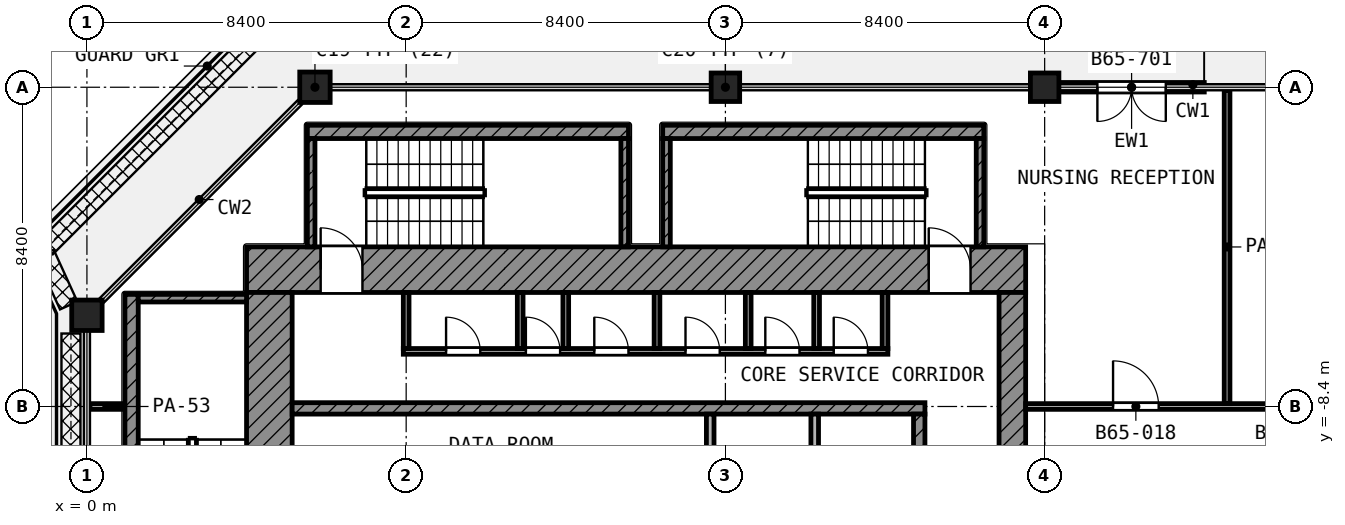
"""IFC4 building model, lengths in metres.
Left out: names, types, materials, properties, quantities, classifications, styles, units other than length and angle.
Written with IfcOpenShell. Run it as: python <this file> out.ifc"""

import sys

from ifc_helpers import new_model, si_unit, direction, frame, frame_2d, origin, origin_2d, place, context, subcontext, project, spatial, rectangle, extrude, element, fill, save


model = new_model("IFC4")
c1 = context("Model", 3, precision=1e-05, world=origin(), true_north=direction((0.0, 1.0)))
c2 = subcontext(c1, "Body", "Model", "MODEL_VIEW")
j1 = project(units=[si_unit("LENGTHUNIT", "METRE"), si_unit("PLANEANGLEUNIT", "RADIAN")], contexts=[c1])
p1 = place(None, origin())
s1 = spatial("IfcSite", under=j1, at=p1, CompositionType="ELEMENT")
p2 = place(p1, origin())
s2 = spatial("IfcBuilding", under=s1, at=p2, CompositionType="ELEMENT")
p3 = place(p2, frame((0.0, 0.0, 281.8)))
s3 = spatial("IfcBuildingStorey", under=s2, at=p3, CompositionType="ELEMENT", Elevation=281.8)
p4 = place(p3, frame((6.0, 0.0, 0.0), z_axis=(0.0, 0.0, 1.0), x_axis=(1.0, 0.0, 0.0)))
e1 = element("IfcColumn", 1, at=p4, inside=s3, PredefinedType="COLUMN", context=c2, shape_type="SweptSolid", body=[
    extrude(rectangle(XDim=0.8, YDim=0.8, at=origin_2d()), origin(), (0.0, 0.0, 1.0), 4.2),
])
for number, where, z_axis, x_axis in (
    (2, (16.8, 0.0, 0.0), (0.0, 0.0, 1.0), (1.0, 0.0, 0.0)),
    (3, (25.2, 0.0, 0.0), (0.0, 0.0, 1.0), (1.0, 0.0, 0.0)),
):
    element("IfcColumn", number, at=place(p3, frame(where, z_axis=z_axis, x_axis=x_axis)), inside=s3, PredefinedType="COLUMN", context=c2, shape_type="SweptSolid", body=[
        extrude(rectangle(XDim=0.75, YDim=0.75, at=origin_2d()), origin(), (0.0, 0.0, 1.0), 4.2),
    ])
p5 = place(p3, frame((0.0, -6.0, 0.0), z_axis=(0.0, 0.0, 1.0), x_axis=(1.0, 0.0, 0.0)))
e4 = element("IfcColumn", 4, at=p5, inside=s3, PredefinedType="COLUMN", context=c2, shape_type="SweptSolid", body=[
    extrude(rectangle(XDim=0.8, YDim=0.8, at=origin_2d()), origin(), (0.0, 0.0, 1.0), 4.2),
])
p6 = place(p3, frame((29.4, 0.0, 0.0), z_axis=(0.0, 0.0, 1.0), x_axis=(-1.0, 0.0, 0.0)))
e5 = element("IfcWall", 5, at=p6, inside=s3, PredefinedType="SOLIDWALL", context=c2, shape_type="SweptSolid", body=[
    extrude(rectangle(XDim=3.825, YDim=0.25, at=frame_2d((1.913, 0.0))), origin(), (0.0, 0.0, 1.0), 3.48),
])
p7 = place(p6, frame((1.012, 0.0, 0.0)))
e6 = element("IfcOpeningElement", 6, at=p7, cuts=e5, PredefinedType="OPENING", context=c2, shape_type="SweptSolid", body=[
    extrude(rectangle(XDim=1.8, YDim=2.1, at=frame_2d((0.9, 1.05))), frame((0.0, 0.135, 0.0), z_axis=(0.0, -1.0, 0.0), x_axis=(1.0, 0.0, 0.0)), (0.0, 0.0, 1.0), 0.27),
])
p8 = place(p3, frame((4.2, -4.8, 0.0), z_axis=(0.0, 0.0, 1.0), x_axis=(1.0, 0.0, 0.0)))
e7 = element("IfcWall", 7, at=p8, inside=s3, PredefinedType="SHEAR", context=c2, shape_type="SweptSolid", body=[
    extrude(rectangle(XDim=20.5, YDim=1.2, at=frame_2d((10.25, 0.0))), origin(), (0.0, 0.0, 1.0), 3.6),
])
p9 = place(p8, frame((1.95, 0.0, 0.0)))
e8 = element("IfcOpeningElement", 8, at=p9, cuts=e7, PredefinedType="OPENING", context=c2, shape_type="SweptSolid", body=[
    extrude(rectangle(XDim=1.1, YDim=2.1, at=frame_2d((0.55, 1.05))), frame((0.0, 0.61, 0.0), z_axis=(0.0, -1.0, 0.0), x_axis=(1.0, 0.0, 0.0)), (0.0, 0.0, 1.0), 1.22),
])
p10 = place(p8, frame((17.95, 0.0, 0.0)))
e9 = element("IfcOpeningElement", 9, at=p10, cuts=e7, PredefinedType="OPENING", context=c2, shape_type="SweptSolid", body=[
    extrude(rectangle(XDim=1.1, YDim=2.1, at=frame_2d((0.55, 1.05))), frame((0.0, 0.61, 0.0), z_axis=(0.0, -1.0, 0.0), x_axis=(1.0, 0.0, 0.0)), (0.0, 0.0, 1.0), 1.22),
])
p11 = place(p3, frame((4.8, -24.7, 0.0), z_axis=(0.0, 0.0, 1.0), x_axis=(0.0, 1.0, 0.0)))
e10 = element("IfcWall", 10, at=p11, inside=s3, PredefinedType="SHEAR", context=c2, shape_type="SweptSolid", body=[
    extrude(rectangle(XDim=19.3, YDim=1.2, at=frame_2d((9.65, 0.0))), origin(), (0.0, 0.0, 1.0), 3.6),
])
p12 = place(p11, frame((11.15, 0.0, 0.0)))
e11 = element("IfcOpeningElement", 11, at=p12, cuts=e10, PredefinedType="OPENING", context=c2, shape_type="SweptSolid", body=[
    extrude(rectangle(XDim=1.1, YDim=2.1, at=frame_2d((0.55, 1.05))), frame((0.0, 0.61, 0.0), z_axis=(0.0, -1.0, 0.0), x_axis=(1.0, 0.0, 0.0)), (0.0, 0.0, 1.0), 1.22),
])
p13 = place(p11, frame((1.85, 0.0, 0.0)))
e12 = element("IfcOpeningElement", 12, at=p13, cuts=e10, PredefinedType="OPENING", context=c2, shape_type="SweptSolid", body=[
    extrude(rectangle(XDim=1.1, YDim=2.1, at=frame_2d((0.55, 1.05))), frame((0.0, 0.61, 0.0), z_axis=(0.0, -1.0, 0.0), x_axis=(1.0, 0.0, 0.0)), (0.0, 0.0, 1.0), 1.22),
])
p14 = place(p3, frame((24.35, -24.0, 0.0), z_axis=(0.0, 0.0, 1.0), x_axis=(0.0, 1.0, 0.0)))
e13 = element("IfcWall", 13, at=p14, inside=s3, PredefinedType="SHEAR", context=c2, shape_type="SweptSolid", body=[
    extrude(rectangle(XDim=18.6, YDim=0.7, at=frame_2d((9.3, 0.0))), origin(), (0.0, 0.0, 1.0), 3.6),
])
p15 = place(p14, frame((10.5, 0.0, 0.0)))
e14 = element("IfcOpeningElement", 14, at=p15, cuts=e13, PredefinedType="OPENING", context=c2, shape_type="SweptSolid", body=[
    extrude(rectangle(XDim=1.8, YDim=2.1, at=frame_2d((0.9, 1.05))), frame((0.0, 0.36, 0.0), z_axis=(0.0, -1.0, 0.0), x_axis=(1.0, 0.0, 0.0)), (0.0, 0.0, 1.0), 0.72),
])
p16 = place(p3, frame((5.4, -8.45, 0.0), z_axis=(0.0, 0.0, 1.0), x_axis=(1.0, 0.0, 0.0)))
e15 = element("IfcWall", 15, at=p16, inside=s3, PredefinedType="SHEAR", context=c2, shape_type="SweptSolid", body=[
    extrude(rectangle(XDim=16.65, YDim=0.3, at=frame_2d((8.325, 0.0))), origin(), (0.0, 0.0, 1.0), 3.6),
])
p17 = place(p3, frame((21.9, -10.95, 0.0), z_axis=(0.0, 0.0, 1.0), x_axis=(0.0, 1.0, 0.0)))
e16 = element("IfcWall", 16, at=p17, inside=s3, PredefinedType="SHEAR", context=c2, shape_type="SweptSolid", body=[
    extrude(rectangle(XDim=2.35, YDim=0.3, at=frame_2d((1.175, 0.0))), origin(), (0.0, 0.0, 1.0), 3.6),
])
for number, where, z_axis, x_axis in (
    (17, (16.4, -10.95, 0.0), (0.0, 0.0, 1.0), (0.0, 1.0, 0.0)),
    (18, (19.15, -10.95, 0.0), (0.0, 0.0, 1.0), (0.0, 1.0, 0.0)),
):
    element("IfcWall", number, at=place(p3, frame(where, z_axis=z_axis, x_axis=x_axis)), inside=s3, PredefinedType="PARTITIONING", context=c2, shape_type="SweptSolid", body=[
        extrude(rectangle(XDim=2.35, YDim=0.2, at=frame_2d((1.175, 0.0))), origin(), (0.0, 0.0, 1.0), 3.6),
    ])
p18 = place(p3, frame((8.325, -6.95, 0.0), z_axis=(0.0, 0.0, 1.0), x_axis=(1.0, 0.0, 0.0)))
e19 = element("IfcWall", 19, at=p18, inside=s3, PredefinedType="PARTITIONING", context=c2, shape_type="SweptSolid", body=[
    extrude(rectangle(XDim=12.75, YDim=0.15, at=frame_2d((6.375, 0.0))), origin(), (0.0, 0.0, 1.0), 3.6),
])
p19 = place(p18, frame((1.125, 0.0, 0.0)))
e20 = element("IfcOpeningElement", 20, at=p19, cuts=e19, PredefinedType="OPENING", context=c2, shape_type="SweptSolid", body=[
    extrude(rectangle(XDim=0.9, YDim=2.1, at=frame_2d((0.45, 1.05))), frame((0.0, 0.085, 0.0), z_axis=(0.0, -1.0, 0.0), x_axis=(1.0, 0.0, 0.0)), (0.0, 0.0, 1.0), 0.17),
])
p20 = place(p18, frame((3.225, 0.0, 0.0)))
e21 = element("IfcOpeningElement", 21, at=p20, cuts=e19, PredefinedType="OPENING", context=c2, shape_type="SweptSolid", body=[
    extrude(rectangle(XDim=0.9, YDim=2.1, at=frame_2d((0.45, 1.05))), frame((0.0, 0.085, 0.0), z_axis=(0.0, -1.0, 0.0), x_axis=(1.0, 0.0, 0.0)), (0.0, 0.0, 1.0), 0.17),
])
p21 = place(p18, frame((5.025, 0.0, 0.0)))
e22 = element("IfcOpeningElement", 22, at=p21, cuts=e19, PredefinedType="OPENING", context=c2, shape_type="SweptSolid", body=[
    extrude(rectangle(XDim=0.9, YDim=2.1, at=frame_2d((0.45, 1.05))), frame((0.0, 0.085, 0.0), z_axis=(0.0, -1.0, 0.0), x_axis=(1.0, 0.0, 0.0)), (0.0, 0.0, 1.0), 0.17),
])
p22 = place(p18, frame((7.425, 0.0, 0.0)))
e23 = element("IfcOpeningElement", 23, at=p22, cuts=e19, PredefinedType="OPENING", context=c2, shape_type="SweptSolid", body=[
    extrude(rectangle(XDim=0.9, YDim=2.1, at=frame_2d((0.45, 1.05))), frame((0.0, 0.085, 0.0), z_axis=(0.0, -1.0, 0.0), x_axis=(1.0, 0.0, 0.0)), (0.0, 0.0, 1.0), 0.17),
])
p23 = place(p18, frame((9.525, 0.0, 0.0)))
e24 = element("IfcOpeningElement", 24, at=p23, cuts=e19, PredefinedType="OPENING", context=c2, shape_type="SweptSolid", body=[
    extrude(rectangle(XDim=0.9, YDim=2.1, at=frame_2d((0.45, 1.05))), frame((0.0, 0.085, 0.0), z_axis=(0.0, -1.0, 0.0), x_axis=(1.0, 0.0, 0.0)), (0.0, 0.0, 1.0), 0.17),
])
p24 = place(p18, frame((11.325, 0.0, 0.0)))
e25 = element("IfcOpeningElement", 25, at=p24, cuts=e19, PredefinedType="OPENING", context=c2, shape_type="SweptSolid", body=[
    extrude(rectangle(XDim=0.9, YDim=2.1, at=frame_2d((0.45, 1.05))), frame((0.0, 0.085, 0.0), z_axis=(0.0, -1.0, 0.0), x_axis=(1.0, 0.0, 0.0)), (0.0, 0.0, 1.0), 0.17),
])
for number, where, z_axis, x_axis in (
    (26, (8.4, -6.875, 0.0), (0.0, 0.0, 1.0), (0.0, 1.0, 0.0)),
    (27, (11.4, -6.875, 0.0), (0.0, 0.0, 1.0), (0.0, 1.0, 0.0)),
    (28, (12.6, -6.875, 0.0), (0.0, 0.0, 1.0), (0.0, 1.0, 0.0)),
    (29, (15.0, -6.875, 0.0), (0.0, 0.0, 1.0), (0.0, 1.0, 0.0)),
    (30, (17.4, -6.875, 0.0), (0.0, 0.0, 1.0), (0.0, 1.0, 0.0)),
    (31, (19.2, -6.875, 0.0), (0.0, 0.0, 1.0), (0.0, 1.0, 0.0)),
    (32, (21.0, -6.875, 0.0), (0.0, 0.0, 1.0), (0.0, 1.0, 0.0)),
):
    element("IfcWall", number, at=place(p3, frame(where, z_axis=z_axis, x_axis=x_axis)), inside=s3, PredefinedType="PARTITIONING", context=c2, shape_type="SweptSolid", body=[
        extrude(rectangle(XDim=1.475, YDim=0.15, at=frame_2d((0.738, 0.0))), origin(), (0.0, 0.0, 1.0), 3.6),
    ])
p25 = place(p3, frame((1.175, -13.9, 0.0), z_axis=(0.0, 0.0, 1.0), x_axis=(0.0, 1.0, 0.0)))
e33 = element("IfcWall", 33, at=p25, inside=s3, PredefinedType="SHEAR", context=c2, shape_type="SweptSolid", body=[
    extrude(rectangle(XDim=8.45, YDim=0.35, at=frame_2d((4.225, 0.0))), origin(), (0.0, 0.0, 1.0), 3.6),
])
p26 = place(p3, frame((1.35, -5.55, 0.0), z_axis=(0.0, 0.0, 1.0), x_axis=(1.0, 0.0, 0.0)))
e34 = element("IfcWall", 34, at=p26, inside=s3, PredefinedType="SHEAR", context=c2, shape_type="SweptSolid", body=[
    extrude(rectangle(XDim=2.85, YDim=0.2, at=frame_2d((1.425, 0.0))), origin(), (0.0, 0.0, 1.0), 3.6),
])
p27 = place(p3, frame((5.8, -1.175, 0.0), z_axis=(0.0, 0.0, 1.0), x_axis=(1.0, 0.0, 0.0)))
e35 = element("IfcWall", 35, at=p27, inside=s3, PredefinedType="SHEAR", context=c2, shape_type="SweptSolid", body=[
    extrude(rectangle(XDim=8.45, YDim=0.35, at=frame_2d((4.225, 0.0))), origin(), (0.0, 0.0, 1.0), 3.6),
])
for number, where, z_axis, x_axis in (
    (36, (5.9, -4.2, 0.0), (0.0, 0.0, 1.0), (0.0, 1.0, 0.0)),
    (37, (14.15, -4.2, 0.0), (0.0, 0.0, 1.0), (0.0, 1.0, 0.0)),
):
    element("IfcWall", number, at=place(p3, frame(where, z_axis=z_axis, x_axis=x_axis)), inside=s3, PredefinedType="SHEAR", context=c2, shape_type="SweptSolid", body=[
        extrude(rectangle(XDim=2.85, YDim=0.2, at=frame_2d((1.425, 0.0))), origin(), (0.0, 0.0, 1.0), 3.6),
    ])
p28 = place(p3, frame((15.15, -1.175, 0.0), z_axis=(0.0, 0.0, 1.0), x_axis=(1.0, 0.0, 0.0)))
e38 = element("IfcWall", 38, at=p28, inside=s3, PredefinedType="SHEAR", context=c2, shape_type="SweptSolid", body=[
    extrude(rectangle(XDim=8.45, YDim=0.35, at=frame_2d((4.225, 0.0))), origin(), (0.0, 0.0, 1.0), 3.6),
])
for number, where, z_axis, x_axis in (
    (39, (15.25, -4.2, 0.0), (0.0, 0.0, 1.0), (0.0, 1.0, 0.0)),
    (40, (23.5, -4.2, 0.0), (0.0, 0.0, 1.0), (0.0, 1.0, 0.0)),
):
    element("IfcWall", number, at=place(p3, frame(where, z_axis=z_axis, x_axis=x_axis)), inside=s3, PredefinedType="SHEAR", context=c2, shape_type="SweptSolid", body=[
        extrude(rectangle(XDim=2.85, YDim=0.2, at=frame_2d((1.425, 0.0))), origin(), (0.0, 0.0, 1.0), 3.6),
    ])
p29 = place(p3, frame((0.08, -8.4, 0.0), z_axis=(0.0, 0.0, 1.0), x_axis=(1.0, 0.0, 0.0)))
e41 = element("IfcWall", 41, at=p29, inside=s3, PredefinedType="PARTITIONING", context=c2, shape_type="SweptSolid", body=[
    extrude(rectangle(XDim=0.89, YDim=0.15, at=frame_2d((0.445, 0.0))), origin(), (0.0, 0.0, 1.0), 2.7),
])
p30 = place(p3, frame((24.7, -8.4, 0.0), z_axis=(0.0, 0.0, 1.0), x_axis=(1.0, 0.0, 0.0)))
e42 = element("IfcWall", 42, at=p30, inside=s3, PredefinedType="PARTITIONING", context=c2, shape_type="SweptSolid", body=[
    extrude(rectangle(XDim=15.582, YDim=0.15, at=frame_2d((7.791, 0.0))), origin(), (0.0, 0.0, 1.0), 3.6),
])
p31 = place(p30, frame((2.3, 0.0, 0.0)))
e43 = element("IfcOpeningElement", 43, at=p31, cuts=e42, PredefinedType="OPENING", context=c2, shape_type="SweptSolid", body=[
    extrude(rectangle(XDim=1.2, YDim=2.1, at=frame_2d((0.6, 1.05))), frame((0.0, 0.085, 0.0), z_axis=(0.0, -1.0, 0.0), x_axis=(1.0, 0.0, 0.0)), (0.0, 0.0, 1.0), 0.17),
])
p32 = place(p30, frame((6.6, 0.0, 0.0)))
e44 = element("IfcOpeningElement", 44, at=p32, cuts=e42, PredefinedType="OPENING", context=c2, shape_type="SweptSolid", body=[
    extrude(rectangle(XDim=1.0, YDim=2.1, at=frame_2d((0.5, 1.05))), frame((0.0, 0.085, 0.0), z_axis=(0.0, -1.0, 0.0), x_axis=(1.0, 0.0, 0.0)), (0.0, 0.0, 1.0), 0.17),
])
p33 = place(p30, frame((10.35, 0.0, 0.0)))
e45 = element("IfcOpeningElement", 45, at=p33, cuts=e42, PredefinedType="OPENING", context=c2, shape_type="SweptSolid", body=[
    extrude(rectangle(XDim=1.0, YDim=2.1, at=frame_2d((0.5, 1.05))), frame((0.0, 0.085, 0.0), z_axis=(0.0, -1.0, 0.0), x_axis=(1.0, 0.0, 0.0)), (0.0, 0.0, 1.0), 0.17),
])
p34 = place(p3, frame((30.0, -8.325, 0.0), z_axis=(0.0, 0.0, 1.0), x_axis=(0.0, 1.0, 0.0)))
e46 = element("IfcWall", 46, at=p34, inside=s3, PredefinedType="PARTITIONING", context=c2, shape_type="SweptSolid", body=[
    extrude(rectangle(XDim=8.245, YDim=0.15, at=frame_2d((4.123, 0.0))), origin(), (0.0, 0.0, 1.0), 3.6),
])
p35 = place(p7, origin())
e47 = element("IfcDoor", 47, at=p35, inside=s3, OperationType="DOUBLE_DOOR_SINGLE_SWING", PredefinedType="DOOR", context=c2, shape_type="SweptSolid", body=[
    extrude(rectangle(XDim=1.8, YDim=2.1, at=frame_2d((0.9, 1.05))), frame((0.0, 0.025, 0.0), z_axis=(0.0, -1.0, 0.0), x_axis=(1.0, 0.0, 0.0)), (0.0, 0.0, 1.0), 0.05),
])
fill(e6, e47)
p36 = place(p9, origin())
e48 = element("IfcDoor", 48, at=p36, inside=s3, OperationType="SINGLE_SWING_LEFT", PredefinedType="DOOR", context=c2, shape_type="SweptSolid", body=[
    extrude(rectangle(XDim=1.1, YDim=2.1, at=frame_2d((0.55, 1.05))), frame((0.0, 0.025, 0.0), z_axis=(0.0, -1.0, 0.0), x_axis=(1.0, 0.0, 0.0)), (0.0, 0.0, 1.0), 0.05),
])
fill(e8, e48)
p37 = place(p10, origin())
e49 = element("IfcDoor", 49, at=p37, inside=s3, OperationType="SINGLE_SWING_LEFT", PredefinedType="DOOR", context=c2, shape_type="SweptSolid", body=[
    extrude(rectangle(XDim=1.1, YDim=2.1, at=frame_2d((0.55, 1.05))), frame((0.0, 0.025, 0.0), z_axis=(0.0, -1.0, 0.0), x_axis=(1.0, 0.0, 0.0)), (0.0, 0.0, 1.0), 0.05),
])
fill(e9, e49)
p38 = place(p19, origin())
e50 = element("IfcDoor", 50, at=p38, inside=s3, OperationType="SINGLE_SWING_LEFT", PredefinedType="DOOR", context=c2, shape_type="SweptSolid", body=[
    extrude(rectangle(XDim=0.9, YDim=2.1, at=frame_2d((0.45, 1.05))), frame((0.0, 0.025, 0.0), z_axis=(0.0, -1.0, 0.0), x_axis=(1.0, 0.0, 0.0)), (0.0, 0.0, 1.0), 0.05),
])
fill(e20, e50)
p39 = place(p20, origin())
e51 = element("IfcDoor", 51, at=p39, inside=s3, OperationType="SINGLE_SWING_LEFT", PredefinedType="DOOR", context=c2, shape_type="SweptSolid", body=[
    extrude(rectangle(XDim=0.9, YDim=2.1, at=frame_2d((0.45, 1.05))), frame((0.0, 0.025, 0.0), z_axis=(0.0, -1.0, 0.0), x_axis=(1.0, 0.0, 0.0)), (0.0, 0.0, 1.0), 0.05),
])
fill(e21, e51)
p40 = place(p21, origin())
e52 = element("IfcDoor", 52, at=p40, inside=s3, OperationType="SINGLE_SWING_LEFT", PredefinedType="DOOR", context=c2, shape_type="SweptSolid", body=[
    extrude(rectangle(XDim=0.9, YDim=2.1, at=frame_2d((0.45, 1.05))), frame((0.0, 0.025, 0.0), z_axis=(0.0, -1.0, 0.0), x_axis=(1.0, 0.0, 0.0)), (0.0, 0.0, 1.0), 0.05),
])
fill(e22, e52)
p41 = place(p22, origin())
e53 = element("IfcDoor", 53, at=p41, inside=s3, OperationType="SINGLE_SWING_LEFT", PredefinedType="DOOR", context=c2, shape_type="SweptSolid", body=[
    extrude(rectangle(XDim=0.9, YDim=2.1, at=frame_2d((0.45, 1.05))), frame((0.0, 0.025, 0.0), z_axis=(0.0, -1.0, 0.0), x_axis=(1.0, 0.0, 0.0)), (0.0, 0.0, 1.0), 0.05),
])
fill(e23, e53)
p42 = place(p23, origin())
e54 = element("IfcDoor", 54, at=p42, inside=s3, OperationType="SINGLE_SWING_LEFT", PredefinedType="DOOR", context=c2, shape_type="SweptSolid", body=[
    extrude(rectangle(XDim=0.9, YDim=2.1, at=frame_2d((0.45, 1.05))), frame((0.0, 0.025, 0.0), z_axis=(0.0, -1.0, 0.0), x_axis=(1.0, 0.0, 0.0)), (0.0, 0.0, 1.0), 0.05),
])
fill(e24, e54)
p43 = place(p24, origin())
e55 = element("IfcDoor", 55, at=p43, inside=s3, OperationType="SINGLE_SWING_LEFT", PredefinedType="DOOR", context=c2, shape_type="SweptSolid", body=[
    extrude(rectangle(XDim=0.9, YDim=2.1, at=frame_2d((0.45, 1.05))), frame((0.0, 0.025, 0.0), z_axis=(0.0, -1.0, 0.0), x_axis=(1.0, 0.0, 0.0)), (0.0, 0.0, 1.0), 0.05),
])
fill(e25, e55)
p44 = place(p31, origin())
e56 = element("IfcDoor", 56, at=p44, inside=s3, OperationType="SINGLE_SWING_LEFT", PredefinedType="DOOR", context=c2, shape_type="SweptSolid", body=[
    extrude(rectangle(XDim=1.2, YDim=2.1, at=frame_2d((0.6, 1.05))), frame((0.0, 0.025, 0.0), z_axis=(0.0, -1.0, 0.0), x_axis=(1.0, 0.0, 0.0)), (0.0, 0.0, 1.0), 0.05),
])
fill(e43, e56)
save(model, sys.argv[1])
